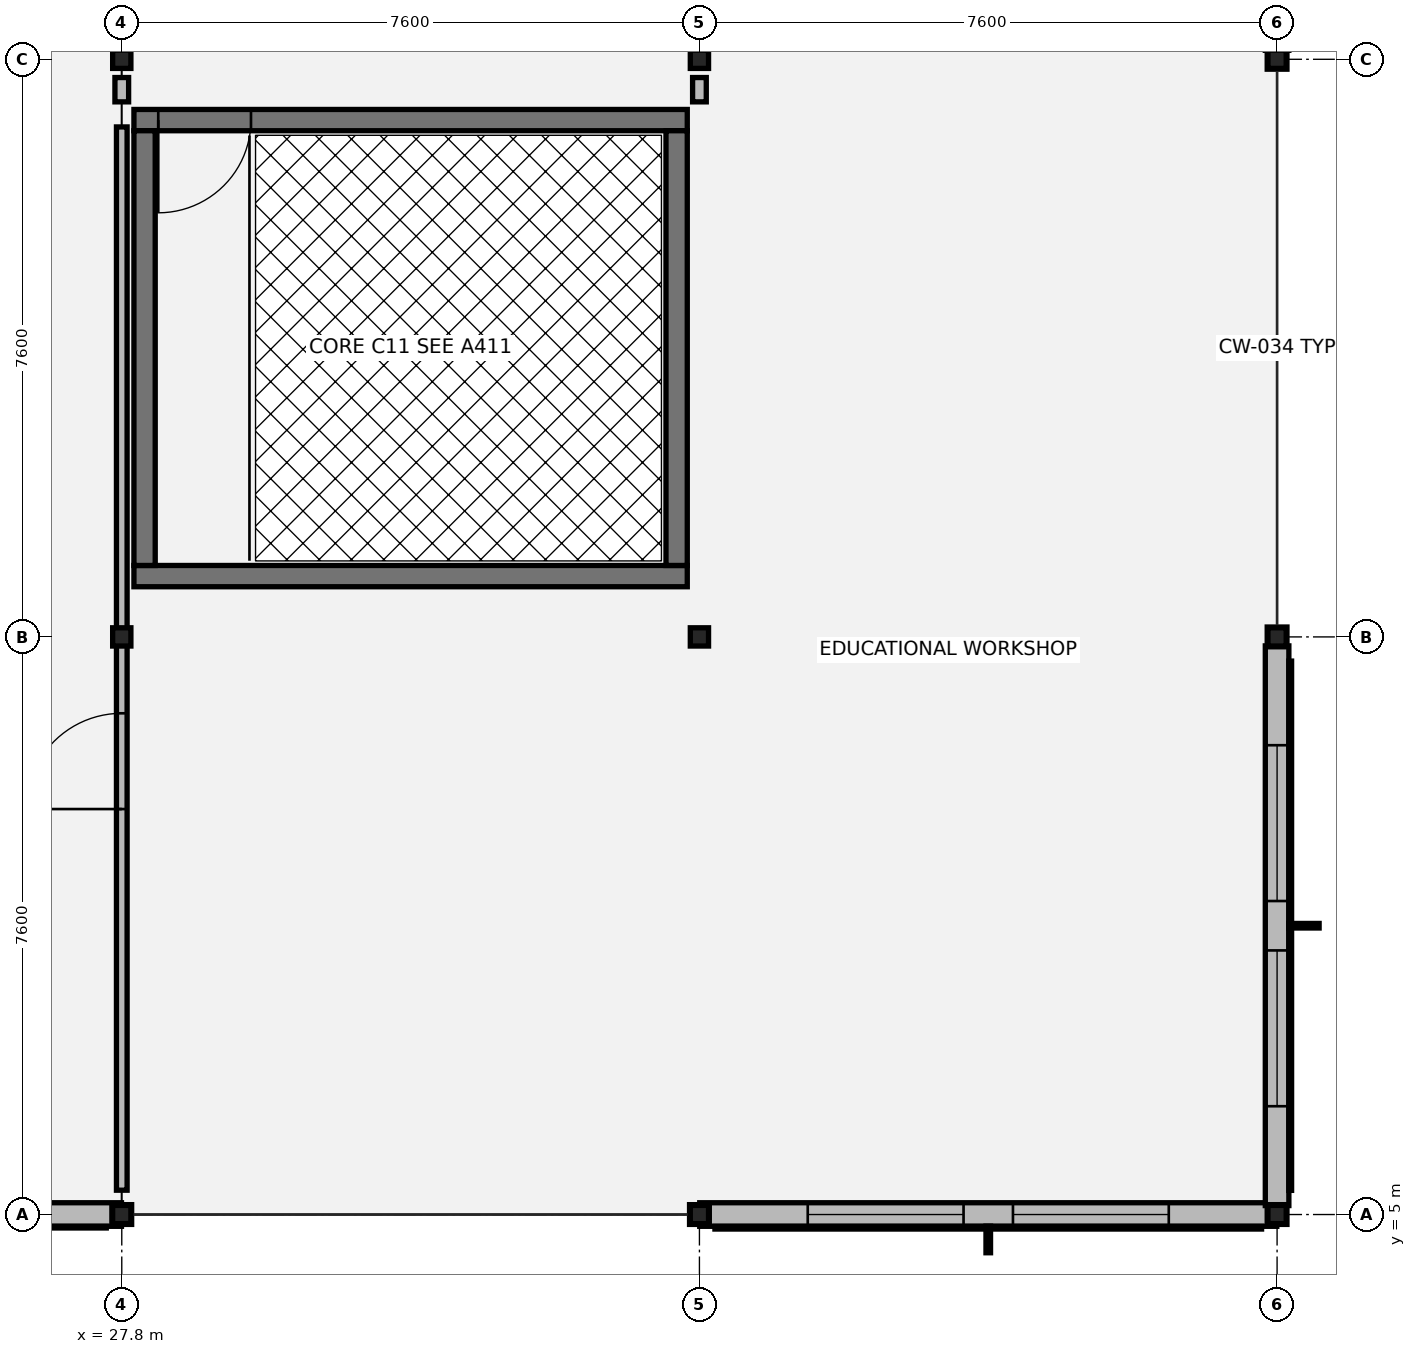
"""IFC4 building model, lengths in metres.
Left out: names, types, materials, properties, quantities, classifications, styles, units other than length and angle.
Written with IfcOpenShell. Run it as: python <this file> out.ifc"""

import sys

from ifc_helpers import new_model, si_unit, direction, frame, frame_2d, origin, origin_2d, place, context, subcontext, project, spatial, rectangle, i_section, extrude, element, fill, save


model = new_model("IFC4")
c1 = context("Model", 3, precision=1e-05, world=origin(), true_north=direction((0.0, 1.0)))
c2 = subcontext(c1, "Body", "Model", "MODEL_VIEW")
j1 = project(units=[si_unit("LENGTHUNIT", "METRE"), si_unit("PLANEANGLEUNIT", "RADIAN")], contexts=[c1])
p1 = place(None, origin())
s1 = spatial("IfcSite", under=j1, at=p1, CompositionType="ELEMENT")
p2 = place(p1, origin())
s2 = spatial("IfcBuilding", under=s1, at=p2, CompositionType="ELEMENT")
p3 = place(p2, frame((0.0, 0.0, 9.18)))
s3 = spatial("IfcBuildingStorey", under=s2, at=p3, CompositionType="ELEMENT", Elevation=9.18)
for number, where, z_axis, x_axis in (
    (1, (27.8, 5.0, 0.0), (0.0, 0.0, 1.0), (1.0, 0.0, 0.0)),
    (2, (27.8, 12.6, 0.0), (0.0, 0.0, 1.0), (1.0, 0.0, 0.0)),
):
    element("IfcColumn", number, at=place(p3, frame(where, z_axis=z_axis, x_axis=x_axis)), inside=s3, PredefinedType="COLUMN", context=c2, shape_type="SweptSolid", body=[
        extrude(i_section(OverallWidth=0.24, OverallDepth=0.24, WebThickness=0.01, FlangeThickness=0.017, at=origin_2d()), origin(), (0.0, 0.0, 1.0), 3.915),
    ])
p4 = place(p3, frame((27.8, 20.2, 0.0), z_axis=(0.0, 0.0, 1.0), x_axis=(1.0, 0.0, 0.0)))
e3 = element("IfcColumn", 3, at=p4, inside=s3, PredefinedType="COLUMN", context=c2, shape_type="SweptSolid", body=[
    extrude(i_section(OverallWidth=0.24, OverallDepth=0.24, WebThickness=0.01, FlangeThickness=0.017, at=origin_2d()), origin(), (0.0, 0.0, 1.0), 4.04),
])
for number, where, z_axis, x_axis in (
    (4, (35.4, 5.0, 0.0), (0.0, 0.0, 1.0), (1.0, 0.0, 0.0)),
    (5, (35.4, 12.6, 0.0), (0.0, 0.0, 1.0), (1.0, 0.0, 0.0)),
):
    element("IfcColumn", number, at=place(p3, frame(where, z_axis=z_axis, x_axis=x_axis)), inside=s3, PredefinedType="COLUMN", context=c2, shape_type="SweptSolid", body=[
        extrude(i_section(OverallWidth=0.24, OverallDepth=0.24, WebThickness=0.01, FlangeThickness=0.017, at=origin_2d()), origin(), (0.0, 0.0, 1.0), 3.915),
    ])
p5 = place(p3, frame((35.4, 20.2, 0.0), z_axis=(0.0, 0.0, 1.0), x_axis=(1.0, 0.0, 0.0)))
e6 = element("IfcColumn", 6, at=p5, inside=s3, PredefinedType="COLUMN", context=c2, shape_type="SweptSolid", body=[
    extrude(i_section(OverallWidth=0.24, OverallDepth=0.24, WebThickness=0.01, FlangeThickness=0.017, at=origin_2d()), origin(), (0.0, 0.0, 1.0), 4.04),
])
for number, where, z_axis, x_axis in (
    (7, (43.0, 5.0, 0.0), (0.0, 0.0, 1.0), (1.0, 0.0, 0.0)),
    (8, (43.0, 12.6, 0.0), (0.0, 0.0, 1.0), (1.0, 0.0, 0.0)),
):
    element("IfcColumn", number, at=place(p3, frame(where, z_axis=z_axis, x_axis=x_axis)), inside=s3, PredefinedType="COLUMN", context=c2, shape_type="SweptSolid", body=[
        extrude(i_section(OverallWidth=0.24, OverallDepth=0.24, WebThickness=0.01, FlangeThickness=0.017, at=origin_2d()), origin(), (0.0, 0.0, 1.0), 3.915),
    ])
p6 = place(p3, frame((43.0, 20.2, 0.0), z_axis=(0.0, 0.0, 1.0), x_axis=(1.0, 0.0, 0.0)))
e9 = element("IfcColumn", 9, at=p6, inside=s3, PredefinedType="COLUMN", context=c2, shape_type="SweptSolid", body=[
    extrude(i_section(OverallWidth=0.24, OverallDepth=0.24, WebThickness=0.01, FlangeThickness=0.017, at=origin_2d()), origin(), (0.0, 0.0, 1.0), 4.04),
])
p7 = place(p3, frame((20.204, 5.0, 0.0), z_axis=(0.0, 0.0, 1.0), x_axis=(1.0, 0.0, 0.0)))
e10 = element("IfcWall", 10, at=p7, inside=s3, PredefinedType="SOLIDWALL", context=c2, shape_type="SweptSolid", body=[
    extrude(rectangle(XDim=7.592, YDim=0.31, at=frame_2d((3.796, 0.0))), origin(), (0.0, 0.0, 1.0), 3.48),
])
p8 = place(p7, frame((1.621, 0.0, 0.8)))
e11 = element("IfcOpeningElement", 11, at=p8, cuts=e10, PredefinedType="OPENING", context=c2, shape_type="SweptSolid", body=[
    extrude(rectangle(XDim=1.85, YDim=2.1, at=frame_2d((0.925, 1.05))), frame((0.0, 0.165, 0.0), z_axis=(0.0, -1.0, 0.0), x_axis=(1.0, 0.0, 0.0)), (0.0, 0.0, 1.0), 0.33),
])
p9 = place(p7, frame((4.121, 0.0, 0.8)))
e12 = element("IfcOpeningElement", 12, at=p9, cuts=e10, PredefinedType="OPENING", context=c2, shape_type="SweptSolid", body=[
    extrude(rectangle(XDim=1.85, YDim=2.1, at=frame_2d((0.925, 1.05))), frame((0.0, 0.165, 0.0), z_axis=(0.0, -1.0, 0.0), x_axis=(1.0, 0.0, 0.0)), (0.0, 0.0, 1.0), 0.33),
])
p10 = place(p3, frame((35.404, 5.0, 0.0), z_axis=(0.0, 0.0, 1.0), x_axis=(1.0, 0.0, 0.0)))
e13 = element("IfcWall", 13, at=p10, inside=s3, PredefinedType="SOLIDWALL", context=c2, shape_type="SweptSolid", body=[
    extrude(rectangle(XDim=7.592, YDim=0.31, at=frame_2d((3.796, 0.0))), origin(), (0.0, 0.0, 1.0), 3.48),
])
p11 = place(p10, frame((1.421, 0.0, 0.8)))
e14 = element("IfcOpeningElement", 14, at=p11, cuts=e13, PredefinedType="OPENING", context=c2, shape_type="SweptSolid", body=[
    extrude(rectangle(XDim=2.05, YDim=2.18, at=frame_2d((1.025, 1.09))), frame((0.0, 0.165, 0.0), z_axis=(0.0, -1.0, 0.0), x_axis=(1.0, 0.0, 0.0)), (0.0, 0.0, 1.0), 0.33),
])
p12 = place(p10, frame((4.121, 0.0, 0.8)))
e15 = element("IfcOpeningElement", 15, at=p12, cuts=e13, PredefinedType="OPENING", context=c2, shape_type="SweptSolid", body=[
    extrude(rectangle(XDim=2.05, YDim=2.18, at=frame_2d((1.025, 1.09))), frame((0.0, 0.165, 0.0), z_axis=(0.0, -1.0, 0.0), x_axis=(1.0, 0.0, 0.0)), (0.0, 0.0, 1.0), 0.33),
])
p13 = place(p3, frame((43.0, 5.118, 0.0), z_axis=(0.0, 0.0, 1.0), x_axis=(0.0, 1.0, 0.0)))
e16 = element("IfcWall", 16, at=p13, inside=s3, PredefinedType="SOLIDWALL", context=c2, shape_type="SweptSolid", body=[
    extrude(rectangle(XDim=7.364, YDim=0.31, at=frame_2d((3.682, 0.0))), origin(), (0.0, 0.0, 1.0), 3.48),
])
p14 = place(p13, frame((1.307, 0.0, 0.8)))
e17 = element("IfcOpeningElement", 17, at=p14, cuts=e16, PredefinedType="OPENING", context=c2, shape_type="SweptSolid", body=[
    extrude(rectangle(XDim=2.05, YDim=2.18, at=frame_2d((1.025, 1.09))), frame((0.0, 0.165, 0.0), z_axis=(0.0, -1.0, 0.0), x_axis=(1.0, 0.0, 0.0)), (0.0, 0.0, 1.0), 0.33),
])
p15 = place(p13, frame((4.007, 0.0, 0.8)))
e18 = element("IfcOpeningElement", 18, at=p15, cuts=e16, PredefinedType="OPENING", context=c2, shape_type="SweptSolid", body=[
    extrude(rectangle(XDim=2.05, YDim=2.18, at=frame_2d((1.025, 1.09))), frame((0.0, 0.165, 0.0), z_axis=(0.0, -1.0, 0.0), x_axis=(1.0, 0.0, 0.0)), (0.0, 0.0, 1.0), 0.33),
])
p16 = place(p3, frame((27.96, 13.4, 0.0), z_axis=(0.0, 0.0, 1.0), x_axis=(1.0, 0.0, 0.0)))
e19 = element("IfcWall", 19, at=p16, inside=s3, PredefinedType="SHEAR", context=c2, shape_type="SweptSolid", body=[
    extrude(rectangle(XDim=7.28, YDim=0.28, at=frame_2d((3.64, 0.0))), origin(), (0.0, 0.0, 1.0), 3.902),
])
p17 = place(p3, frame((27.96, 19.4, 0.0), z_axis=(0.0, 0.0, 1.0), x_axis=(1.0, 0.0, 0.0)))
e20 = element("IfcWall", 20, at=p17, inside=s3, PredefinedType="SHEAR", context=c2, shape_type="SweptSolid", body=[
    extrude(rectangle(XDim=7.28, YDim=0.28, at=frame_2d((3.64, 0.0))), origin(), (0.0, 0.0, 1.0), 3.902),
])
p18 = place(p17, frame((0.32, 0.0, 0.0)))
e21 = element("IfcOpeningElement", 21, at=p18, cuts=e20, PredefinedType="OPENING", context=c2, shape_type="SweptSolid", body=[
    extrude(rectangle(XDim=1.22, YDim=2.18, at=frame_2d((0.61, 1.09))), frame((0.0, 0.15, 0.0), z_axis=(0.0, -1.0, 0.0), x_axis=(1.0, 0.0, 0.0)), (0.0, 0.0, 1.0), 0.3),
])
for number, where, z_axis, x_axis in (
    (22, (28.1, 13.54, 0.0), (0.0, 0.0, 1.0), (0.0, 1.0, 0.0)),
    (23, (35.1, 13.54, 0.0), (0.0, 0.0, 1.0), (0.0, 1.0, 0.0)),
):
    element("IfcWall", number, at=place(p3, frame(where, z_axis=z_axis, x_axis=x_axis)), inside=s3, PredefinedType="SHEAR", context=c2, shape_type="SweptSolid", body=[
        extrude(rectangle(XDim=5.72, YDim=0.28, at=frame_2d((2.86, 0.0))), origin(), (0.0, 0.0, 1.0), 3.902),
    ])
for number, where, z_axis, x_axis in (
    (24, (27.8, 19.64, 0.0), (0.0, 0.0, 1.0), (0.0, 1.0, 0.0)),
    (25, (35.4, 19.64, 0.0), (0.0, 0.0, 1.0), (0.0, 1.0, 0.0)),
):
    element("IfcWall", number, at=place(p3, frame(where, z_axis=z_axis, x_axis=x_axis)), inside=s3, PredefinedType="PARTITIONING", context=c2, shape_type="SweptSolid", body=[
        extrude(rectangle(XDim=0.32, YDim=0.18, at=frame_2d((0.16, 0.0))), origin(), (0.0, 0.0, 1.0), 3.18),
    ])
p19 = place(p3, frame((27.8, 5.32, 0.0), z_axis=(0.0, 0.0, 1.0), x_axis=(0.0, 1.0, 0.0)))
e26 = element("IfcWall", 26, at=p19, inside=s3, PredefinedType="PARTITIONING", context=c2, shape_type="SweptSolid", body=[
    extrude(rectangle(XDim=13.99, YDim=0.14, at=frame_2d((6.995, 0.0))), origin(), (0.0, 0.0, 1.0), 2.445),
])
p20 = place(p19, frame((5.015, 0.0, 0.0)))
e27 = element("IfcOpeningElement", 27, at=p20, cuts=e26, PredefinedType="OPENING", context=c2, shape_type="SweptSolid", body=[
    extrude(rectangle(XDim=1.26, YDim=2.2, at=frame_2d((0.63, 1.1))), frame((0.0, 0.08, 0.0), z_axis=(0.0, -1.0, 0.0), x_axis=(1.0, 0.0, 0.0)), (0.0, 0.0, 1.0), 0.16),
])
p21 = place(p11, origin())
e28 = element("IfcWindow", 28, at=p21, inside=s3, PartitioningType="SINGLE_PANEL", PredefinedType="WINDOW", context=c2, shape_type="SweptSolid", body=[
    extrude(rectangle(XDim=2.05, YDim=2.18, at=frame_2d((1.025, 1.09))), frame((0.0, 0.03, 0.0), z_axis=(0.0, -1.0, 0.0), x_axis=(1.0, 0.0, 0.0)), (0.0, 0.0, 1.0), 0.06),
])
fill(e14, e28)
p22 = place(p12, origin())
e29 = element("IfcWindow", 29, at=p22, inside=s3, PartitioningType="SINGLE_PANEL", PredefinedType="WINDOW", context=c2, shape_type="SweptSolid", body=[
    extrude(rectangle(XDim=2.05, YDim=2.18, at=frame_2d((1.025, 1.09))), frame((0.0, 0.03, 0.0), z_axis=(0.0, -1.0, 0.0), x_axis=(1.0, 0.0, 0.0)), (0.0, 0.0, 1.0), 0.06),
])
fill(e15, e29)
p23 = place(p14, origin())
e30 = element("IfcWindow", 30, at=p23, inside=s3, PartitioningType="SINGLE_PANEL", PredefinedType="WINDOW", context=c2, shape_type="SweptSolid", body=[
    extrude(rectangle(XDim=2.05, YDim=2.18, at=frame_2d((1.025, 1.09))), frame((0.0, 0.03, 0.0), z_axis=(0.0, -1.0, 0.0), x_axis=(1.0, 0.0, 0.0)), (0.0, 0.0, 1.0), 0.06),
])
fill(e17, e30)
p24 = place(p15, origin())
e31 = element("IfcWindow", 31, at=p24, inside=s3, PartitioningType="SINGLE_PANEL", PredefinedType="WINDOW", context=c2, shape_type="SweptSolid", body=[
    extrude(rectangle(XDim=2.05, YDim=2.18, at=frame_2d((1.025, 1.09))), frame((0.0, 0.03, 0.0), z_axis=(0.0, -1.0, 0.0), x_axis=(1.0, 0.0, 0.0)), (0.0, 0.0, 1.0), 0.06),
])
fill(e18, e31)
p25 = place(p18, origin())
e32 = element("IfcDoor", 32, at=p25, inside=s3, OperationType="SINGLE_SWING_RIGHT", PredefinedType="DOOR", context=c2, shape_type="SweptSolid", body=[
    extrude(rectangle(XDim=1.22, YDim=2.18, at=frame_2d((0.61, 1.09))), frame((0.0, 0.025, 0.0), z_axis=(0.0, -1.0, 0.0), x_axis=(1.0, 0.0, 0.0)), (0.0, 0.0, 1.0), 0.05),
])
fill(e21, e32)
p26 = place(p20, origin())
e33 = element("IfcDoor", 33, at=p26, inside=s3, OperationType="SINGLE_SWING_LEFT", PredefinedType="DOOR", context=c2, shape_type="SweptSolid", body=[
    extrude(rectangle(XDim=1.26, YDim=2.2, at=frame_2d((0.63, 1.1))), frame((0.0, 0.025, 0.0), z_axis=(0.0, -1.0, 0.0), x_axis=(1.0, 0.0, 0.0)), (0.0, 0.0, 1.0), 0.05),
])
fill(e27, e33)
save(model, sys.argv[1])
